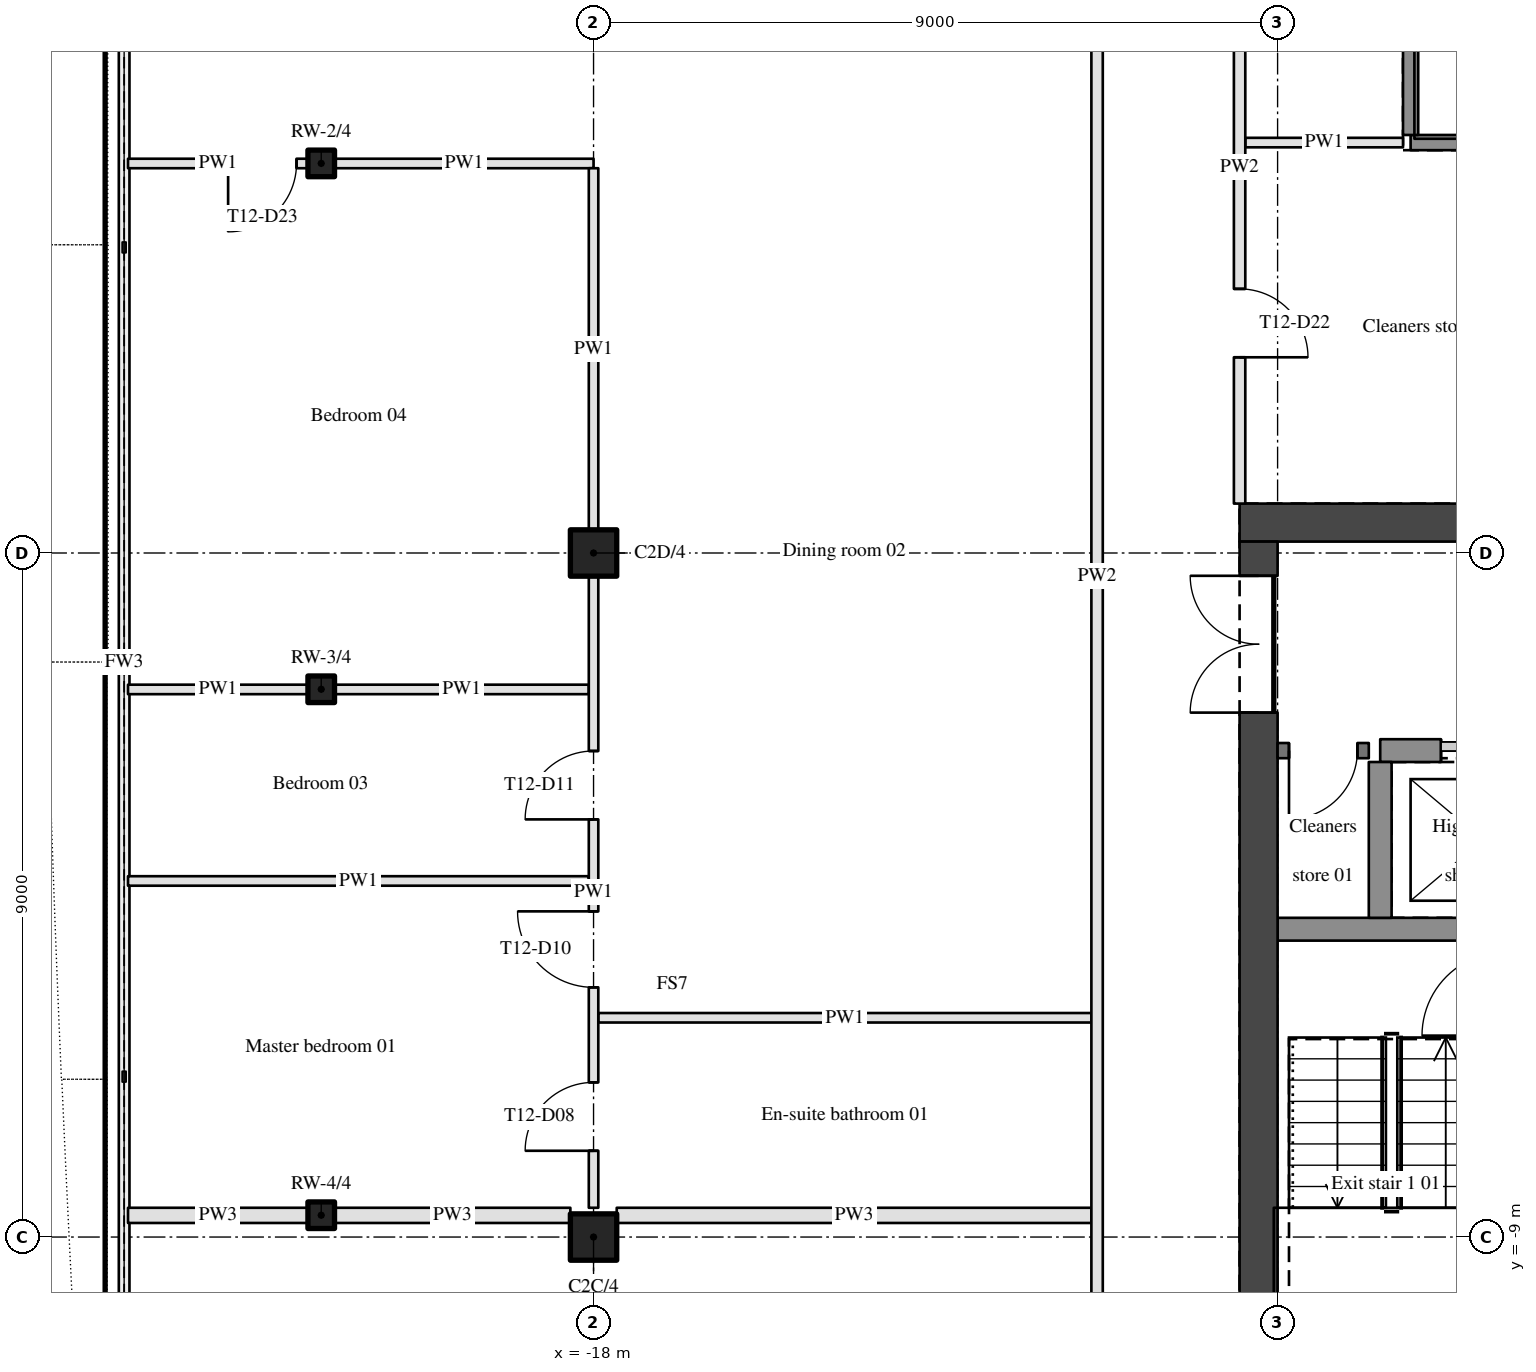
"""IFC4 building model, lengths in metres.
Left out: names, types, materials, properties, quantities, classifications, styles, units other than length and angle.
Written with IfcOpenShell. Run it as: python <this file> out.ifc"""

import sys

from ifc_helpers import new_model, si_unit, direction, frame, frame_2d, origin, origin_2d, place, context, subcontext, project, spatial, rectangle, hollow_rectangle, hollow_circle, extrude, element, fill, save


model = new_model("IFC4")
c1 = context("Model", 3, precision=1e-05, world=origin(), true_north=direction((0.0, 1.0)))
c2 = subcontext(c1, "Body", "Model", "MODEL_VIEW")
j1 = project(units=[si_unit("LENGTHUNIT", "METRE"), si_unit("PLANEANGLEUNIT", "RADIAN")], contexts=[c1])
p1 = place(None, origin())
s1 = spatial("IfcSite", under=j1, at=p1, CompositionType="ELEMENT")
p2 = place(p1, origin())
s2 = spatial("IfcBuilding", under=s1, at=p2, CompositionType="ELEMENT")
p3 = place(p2, frame((0.0, 0.0, 172.2)))
s3 = spatial("IfcBuildingStorey", under=s2, at=p3, CompositionType="ELEMENT", Elevation=172.2)
for number, where, z_axis, x_axis in (
    (1, (-18.0, -9.0, 0.0), (0.0, 0.0, 1.0), (1.0, 0.0, 0.0)),
    (2, (-18.0, 0.0, 0.0), (0.0, 0.0, 1.0), (1.0, 0.0, 0.0)),
):
    element("IfcColumn", number, at=place(p3, frame(where, z_axis=z_axis, x_axis=x_axis)), inside=s3, PredefinedType="COLUMN", context=c2, shape_type="SweptSolid", body=[
        extrude(hollow_circle(Radius=0.305, WallThickness=0.03, at=origin_2d()), origin(), (0.0, 0.0, 1.0), 3.15),
    ])
for number, where, z_axis, x_axis in (
    (3, (-21.583, 5.126, 0.0), (0.0, 0.0, 1.0), (1.0, 0.0, 0.0)),
    (4, (-21.583, -1.793, 0.0), (0.0, 0.0, 1.0), (1.0, 0.0, 0.0)),
    (5, (-21.583, -8.713, 0.0), (0.0, 0.0, 1.0), (1.0, 0.0, 0.0)),
):
    element("IfcColumn", number, at=place(p3, frame(where, z_axis=z_axis, x_axis=x_axis)), inside=s3, PredefinedType="COLUMN", context=c2, shape_type="SweptSolid", body=[
        extrude(hollow_rectangle(XDim=0.35, YDim=0.35, WallThickness=0.02, InnerFilletRadius=0.03, OuterFilletRadius=0.05, at=origin_2d()), origin(), (0.0, 0.0, 1.0), 3.15),
    ])
p4 = place(p3, frame((-9.5, 0.4, 0.0), z_axis=(0.0, 0.0, 1.0), x_axis=(1.0, 0.0, 0.0)))
e6 = element("IfcWall", 6, at=p4, inside=s3, PredefinedType="SHEAR", context=c2, shape_type="SweptSolid", body=[
    extrude(rectangle(XDim=19.0, YDim=0.5, at=frame_2d((9.5, 0.0))), origin(), (0.0, 0.0, 1.0), 3.15),
])
p5 = place(p4, frame((8.6, 0.0, 0.0)))
e7 = element("IfcOpeningElement", 7, at=p5, cuts=e6, PredefinedType="OPENING", context=c2, shape_type="SweptSolid", body=[
    extrude(rectangle(XDim=1.8, YDim=2.1, at=frame_2d((0.9, 1.05))), frame((0.0, 0.26, 0.0), z_axis=(0.0, -1.0, 0.0), x_axis=(1.0, 0.0, 0.0)), (0.0, 0.0, 1.0), 0.52),
])
p6 = place(p3, frame((-9.25, -11.5, 0.0), z_axis=(0.0, 0.0, 1.0), x_axis=(0.0, 1.0, 0.0)))
e8 = element("IfcWall", 8, at=p6, inside=s3, PredefinedType="SHEAR", context=c2, shape_type="SweptSolid", body=[
    extrude(rectangle(XDim=11.65, YDim=0.5, at=frame_2d((5.825, 0.0))), origin(), (0.0, 0.0, 1.0), 3.15),
])
p7 = place(p6, frame((9.4, 0.0, 0.0)))
e9 = element("IfcOpeningElement", 9, at=p7, cuts=e8, PredefinedType="OPENING", context=c2, shape_type="SweptSolid", body=[
    extrude(rectangle(XDim=1.8, YDim=2.1, at=frame_2d((0.9, 1.05))), frame((0.0, 0.26, 0.0), z_axis=(0.0, -1.0, 0.0), x_axis=(1.0, 0.0, 0.0)), (0.0, 0.0, 1.0), 0.52),
])
p8 = place(p3, frame((-24.125, -8.715, 0.0), z_axis=(0.0, 0.0, 1.0), x_axis=(1.0, 0.0, 0.0)))
e10 = element("IfcWall", 10, at=p8, inside=s3, PredefinedType="PARTITIONING", context=c2, shape_type="SweptSolid", body=[
    extrude(rectangle(XDim=2.367, YDim=0.2, at=frame_2d((1.184, 0.0))), origin(), (0.0, 0.0, 1.0), 2.21),
])
p9 = place(p3, frame((-21.408, -8.715, 0.0), z_axis=(0.0, 0.0, 1.0), x_axis=(1.0, 0.0, 0.0)))
e11 = element("IfcWall", 11, at=p9, inside=s3, PredefinedType="PARTITIONING", context=c2, shape_type="SweptSolid", body=[
    extrude(rectangle(XDim=3.103, YDim=0.2, at=frame_2d((1.552, 0.0))), origin(), (0.0, 0.0, 1.0), 2.21),
])
p10 = place(p3, frame((-17.695, -8.715, 0.0), z_axis=(0.0, 0.0, 1.0), x_axis=(1.0, 0.0, 0.0)))
e12 = element("IfcWall", 12, at=p10, inside=s3, PredefinedType="PARTITIONING", context=c2, shape_type="SweptSolid", body=[
    extrude(rectangle(XDim=6.245, YDim=0.2, at=frame_2d((3.123, 0.0))), origin(), (0.0, 0.0, 1.0), 2.21),
])
p11 = place(p3, frame((-17.938, -6.115, 0.0), z_axis=(0.0, 0.0, 1.0), x_axis=(1.0, 0.0, 0.0)))
e13 = element("IfcWall", 13, at=p11, inside=s3, PredefinedType="PARTITIONING", context=c2, shape_type="SweptSolid", body=[
    extrude(rectangle(XDim=6.488, YDim=0.125, at=frame_2d((3.244, 0.0))), origin(), (0.0, 0.0, 1.0), 2.21),
])
p12 = place(p3, frame((-9.0, -4.95, 0.0), z_axis=(0.0, 0.0, 1.0), x_axis=(1.0, 0.0, 0.0)))
e14 = element("IfcWall", 14, at=p12, inside=s3, PredefinedType="SHEAR", context=c2, shape_type="SweptSolid", body=[
    extrude(rectangle(XDim=6.75, YDim=0.3, at=frame_2d((3.375, 0.0))), origin(), (0.0, 0.0, 1.0), 3.15),
])
p13 = place(p3, frame((-24.125, -4.315, 0.0), z_axis=(0.0, 0.0, 1.0), x_axis=(1.0, 0.0, 0.0)))
e15 = element("IfcWall", 15, at=p13, inside=s3, PredefinedType="PARTITIONING", context=c2, shape_type="SweptSolid", body=[
    extrude(rectangle(XDim=6.062, YDim=0.125, at=frame_2d((3.031, 0.0))), origin(), (0.0, 0.0, 1.0), 2.21),
])
p14 = place(p3, frame((-7.8, -2.6, 0.0), z_axis=(0.0, 0.0, 1.0), x_axis=(-1.0, 0.0, 0.0)))
e16 = element("IfcWall", 16, at=p14, inside=s3, PredefinedType="SOLIDWALL", context=c2, shape_type="SweptSolid", body=[
    extrude(rectangle(XDim=1.2, YDim=0.2, at=frame_2d((0.6, 0.0))), origin(), (0.0, 0.0, 1.0), 2.85),
])
p15 = place(p14, frame((0.15, 0.0, 0.0)))
e17 = element("IfcOpeningElement", 17, at=p15, cuts=e16, PredefinedType="OPENING", context=c2, shape_type="SweptSolid", body=[
    extrude(rectangle(XDim=0.9, YDim=2.1, at=frame_2d((0.45, 1.05))), frame((0.0, 0.11, 0.0), z_axis=(0.0, -1.0, 0.0), x_axis=(1.0, 0.0, 0.0)), (0.0, 0.0, 1.0), 0.22),
])
p16 = place(p3, frame((-7.65, -2.6, 0.0), z_axis=(0.0, 0.0, 1.0), x_axis=(1.0, 0.0, 0.0)))
e18 = element("IfcWall", 18, at=p16, inside=s3, PredefinedType="SHEAR", context=c2, shape_type="SweptSolid", body=[
    extrude(rectangle(XDim=5.4, YDim=0.3, at=frame_2d((2.7, 0.0))), origin(), (0.0, 0.0, 1.0), 3.15),
])
p17 = place(p16, frame((0.8, 0.0, 0.0)))
e19 = element("IfcOpeningElement", 19, at=p17, cuts=e18, PredefinedType="OPENING", context=c2, shape_type="SweptSolid", body=[
    extrude(rectangle(XDim=1.1, YDim=2.1, at=frame_2d((0.55, 1.05))), frame((0.0, 0.16, 0.0), z_axis=(0.0, -1.0, 0.0), x_axis=(1.0, 0.0, 0.0)), (0.0, 0.0, 1.0), 0.32),
])
p18 = place(p16, frame((3.5, 0.0, 0.0)))
e20 = element("IfcOpeningElement", 20, at=p18, cuts=e18, PredefinedType="OPENING", context=c2, shape_type="SweptSolid", body=[
    extrude(rectangle(XDim=1.1, YDim=2.1, at=frame_2d((0.55, 1.05))), frame((0.0, 0.16, 0.0), z_axis=(0.0, -1.0, 0.0), x_axis=(1.0, 0.0, 0.0)), (0.0, 0.0, 1.0), 0.32),
])
p19 = place(p3, frame((-24.125, -1.795, 0.0), z_axis=(0.0, 0.0, 1.0), x_axis=(1.0, 0.0, 0.0)))
e21 = element("IfcWall", 21, at=p19, inside=s3, PredefinedType="PARTITIONING", context=c2, shape_type="SweptSolid", body=[
    extrude(rectangle(XDim=2.367, YDim=0.125, at=frame_2d((1.184, 0.0))), origin(), (0.0, 0.0, 1.0), 2.21),
])
p20 = place(p3, frame((-21.408, -1.795, 0.0), z_axis=(0.0, 0.0, 1.0), x_axis=(1.0, 0.0, 0.0)))
e22 = element("IfcWall", 22, at=p20, inside=s3, PredefinedType="PARTITIONING", context=c2, shape_type="SweptSolid", body=[
    extrude(rectangle(XDim=3.345, YDim=0.125, at=frame_2d((1.673, 0.0))), origin(), (0.0, 0.0, 1.0), 2.21),
])
p21 = place(p3, frame((-21.758, 5.125, 0.0), z_axis=(0.0, 0.0, 1.0), x_axis=(-1.0, 0.0, 0.0)))
e23 = element("IfcWall", 23, at=p21, inside=s3, PredefinedType="PARTITIONING", context=c2, shape_type="SweptSolid", body=[
    extrude(rectangle(XDim=2.367, YDim=0.125, at=frame_2d((1.184, 0.0))), origin(), (0.0, 0.0, 1.0), 2.21),
])
p22 = place(p21, frame((0.15, 0.0, 0.0)))
e24 = element("IfcOpeningElement", 24, at=p22, cuts=e23, PredefinedType="OPENING", context=c2, shape_type="SweptSolid", body=[
    extrude(rectangle(XDim=0.9, YDim=2.1, at=frame_2d((0.45, 1.05))), frame((0.0, 0.073, 0.0), z_axis=(0.0, -1.0, 0.0), x_axis=(1.0, 0.0, 0.0)), (0.0, 0.0, 1.0), 0.145),
])
p23 = place(p3, frame((-21.408, 5.125, 0.0), z_axis=(0.0, 0.0, 1.0), x_axis=(1.0, 0.0, 0.0)))
e25 = element("IfcWall", 25, at=p23, inside=s3, PredefinedType="PARTITIONING", context=c2, shape_type="SweptSolid", body=[
    extrude(rectangle(XDim=3.408, YDim=0.125, at=frame_2d((1.704, 0.0))), origin(), (0.0, 0.0, 1.0), 2.21),
])
p24 = place(p3, frame((-9.425, 5.4, 0.0), z_axis=(0.0, 0.0, 1.0), x_axis=(1.0, 0.0, 0.0)))
e26 = element("IfcWall", 26, at=p24, inside=s3, PredefinedType="PARTITIONING", context=c2, shape_type="SweptSolid", body=[
    extrude(rectangle(XDim=2.075, YDim=0.125, at=frame_2d((1.038, 0.0))), origin(), (0.0, 0.0, 1.0), 2.21),
])
p25 = place(p3, frame((-7.25, 5.4, 0.0), z_axis=(0.0, 0.0, 1.0), x_axis=(1.0, 0.0, 0.0)))
e27 = element("IfcWall", 27, at=p25, inside=s3, PredefinedType="SHEAR", context=c2, shape_type="SweptSolid", body=[
    extrude(rectangle(XDim=6.6, YDim=0.2, at=frame_2d((3.3, 0.0))), origin(), (0.0, 0.0, 1.0), 3.15),
])
p26 = place(p25, frame((5.35, 0.0, 0.0)))
e28 = element("IfcOpeningElement", 28, at=p26, cuts=e27, PredefinedType="OPENING", context=c2, shape_type="SweptSolid", body=[
    extrude(rectangle(XDim=1.1, YDim=2.1, at=frame_2d((0.55, 1.05))), frame((0.0, 0.11, 0.0), z_axis=(0.0, -1.0, 0.0), x_axis=(1.0, 0.0, 0.0)), (0.0, 0.0, 1.0), 0.22),
])
p27 = place(p3, frame((-18.0, -8.615, 0.0), z_axis=(0.0, 0.0, 1.0), x_axis=(0.0, 1.0, 0.0)))
e29 = element("IfcWall", 29, at=p27, inside=s3, PredefinedType="PARTITIONING", context=c2, shape_type="SweptSolid", body=[
    extrude(rectangle(XDim=8.31, YDim=0.125, at=frame_2d((4.155, 0.0))), origin(), (0.0, 0.0, 1.0), 2.21),
])
p28 = place(p27, frame((5.11, 0.0, 0.0)))
e30 = element("IfcOpeningElement", 30, at=p28, cuts=e29, PredefinedType="OPENING", context=c2, shape_type="SweptSolid", body=[
    extrude(rectangle(XDim=0.9, YDim=2.1, at=frame_2d((0.45, 1.05))), frame((0.0, 0.073, 0.0), z_axis=(0.0, -1.0, 0.0), x_axis=(1.0, 0.0, 0.0)), (0.0, 0.0, 1.0), 0.145),
])
p29 = place(p27, frame((2.9, 0.0, 0.0)))
e31 = element("IfcOpeningElement", 31, at=p29, cuts=e29, PredefinedType="OPENING", context=c2, shape_type="SweptSolid", body=[
    extrude(rectangle(XDim=1.0, YDim=2.1, at=frame_2d((0.5, 1.05))), frame((0.0, 0.073, 0.0), z_axis=(0.0, -1.0, 0.0), x_axis=(1.0, 0.0, 0.0)), (0.0, 0.0, 1.0), 0.145),
])
p30 = place(p27, frame((0.75, 0.0, 0.0)))
e32 = element("IfcOpeningElement", 32, at=p30, cuts=e29, PredefinedType="OPENING", context=c2, shape_type="SweptSolid", body=[
    extrude(rectangle(XDim=0.9, YDim=2.1, at=frame_2d((0.45, 1.05))), frame((0.0, 0.073, 0.0), z_axis=(0.0, -1.0, 0.0), x_axis=(1.0, 0.0, 0.0)), (0.0, 0.0, 1.0), 0.145),
])
p31 = place(p3, frame((-18.0, 0.305, 0.0), z_axis=(0.0, 0.0, 1.0), x_axis=(0.0, 1.0, 0.0)))
e33 = element("IfcWall", 33, at=p31, inside=s3, PredefinedType="PARTITIONING", context=c2, shape_type="SweptSolid", body=[
    extrude(rectangle(XDim=4.758, YDim=0.125, at=frame_2d((2.379, 0.0))), origin(), (0.0, 0.0, 1.0), 2.21),
])
p32 = place(p3, frame((-11.375, -11.925, 0.0), z_axis=(0.0, 0.0, 1.0), x_axis=(0.0, 1.0, 0.0)))
e34 = element("IfcWall", 34, at=p32, inside=s3, PredefinedType="PARTITIONING", context=c2, shape_type="SweptSolid", body=[
    extrude(rectangle(XDim=23.25, YDim=0.15, at=frame_2d((11.625, 0.0))), origin(), (0.0, 0.0, 1.0), 2.21),
])
p33 = place(p32, frame((1.067, 0.0, 0.0)))
e35 = element("IfcOpeningElement", 35, at=p33, cuts=e34, PredefinedType="OPENING", context=c2, shape_type="SweptSolid", body=[
    extrude(rectangle(XDim=1.0, YDim=2.1, at=frame_2d((0.5, 1.05))), frame((0.0, 0.085, 0.0), z_axis=(0.0, -1.0, 0.0), x_axis=(1.0, 0.0, 0.0)), (0.0, 0.0, 1.0), 0.17),
])
p34 = place(p32, frame((19.01, 0.0, 0.0)))
e36 = element("IfcOpeningElement", 36, at=p34, cuts=e34, PredefinedType="OPENING", context=c2, shape_type="SweptSolid", body=[
    extrude(rectangle(XDim=1.0, YDim=2.1, at=frame_2d((0.5, 1.05))), frame((0.0, 0.085, 0.0), z_axis=(0.0, -1.0, 0.0), x_axis=(1.0, 0.0, 0.0)), (0.0, 0.0, 1.0), 0.17),
])
p35 = place(p3, frame((-9.5, 9.5, 0.0), z_axis=(0.0, 0.0, 1.0), x_axis=(0.0, -1.0, 0.0)))
e37 = element("IfcWall", 37, at=p35, inside=s3, PredefinedType="PARTITIONING", context=c2, shape_type="SweptSolid", body=[
    extrude(rectangle(XDim=8.85, YDim=0.15, at=frame_2d((4.425, 0.0))), origin(), (0.0, 0.0, 1.0), 2.21),
])
p36 = place(p35, frame((6.025, 0.0, 0.0)))
e38 = element("IfcOpeningElement", 38, at=p36, cuts=e37, PredefinedType="OPENING", context=c2, shape_type="SweptSolid", body=[
    extrude(rectangle(XDim=0.9, YDim=2.1, at=frame_2d((0.45, 1.05))), frame((0.0, 0.085, 0.0), z_axis=(0.0, -1.0, 0.0), x_axis=(1.0, 0.0, 0.0)), (0.0, 0.0, 1.0), 0.17),
])
p37 = place(p3, frame((-7.65, -4.8, 0.0), z_axis=(0.0, 0.0, 1.0), x_axis=(0.0, 1.0, 0.0)))
e39 = element("IfcWall", 39, at=p37, inside=s3, PredefinedType="SHEAR", context=c2, shape_type="SweptSolid", body=[
    extrude(rectangle(XDim=2.05, YDim=0.3, at=frame_2d((1.025, 0.0))), origin(), (0.0, 0.0, 1.0), 3.15),
])
p38 = place(p3, frame((-7.25, 5.5, 0.0), z_axis=(0.0, 0.0, 1.0), x_axis=(0.0, 1.0, 0.0)))
e40 = element("IfcWall", 40, at=p38, inside=s3, PredefinedType="SHEAR", context=c2, shape_type="SweptSolid", body=[
    extrude(rectangle(XDim=2.7, YDim=0.2, at=frame_2d((1.35, 0.0))), origin(), (0.0, 0.0, 1.0), 3.15),
])
p39 = place(p7, origin())
e41 = element("IfcDoor", 41, at=p39, inside=s3, OperationType="DOUBLE_DOOR_SINGLE_SWING", PredefinedType="DOOR", context=c2, shape_type="SweptSolid", body=[
    extrude(rectangle(XDim=1.8, YDim=2.1, at=frame_2d((0.9, 1.05))), frame((0.0, 0.025, 0.0), z_axis=(0.0, -1.0, 0.0), x_axis=(1.0, 0.0, 0.0)), (0.0, 0.0, 1.0), 0.05),
])
fill(e9, e41)
p40 = place(p15, origin())
e42 = element("IfcDoor", 42, at=p40, inside=s3, OperationType="SINGLE_SWING_RIGHT", PredefinedType="DOOR", context=c2, shape_type="SweptSolid", body=[
    extrude(rectangle(XDim=0.9, YDim=2.1, at=frame_2d((0.45, 1.05))), frame((0.0, 0.025, 0.0), z_axis=(0.0, -1.0, 0.0), x_axis=(1.0, 0.0, 0.0)), (0.0, 0.0, 1.0), 0.05),
])
fill(e17, e42)
p41 = place(p28, origin())
e43 = element("IfcDoor", 43, at=p41, inside=s3, OperationType="SINGLE_SWING_LEFT", PredefinedType="DOOR", context=c2, shape_type="SweptSolid", body=[
    extrude(rectangle(XDim=0.9, YDim=2.1, at=frame_2d((0.45, 1.05))), frame((0.0, 0.025, 0.0), z_axis=(0.0, -1.0, 0.0), x_axis=(1.0, 0.0, 0.0)), (0.0, 0.0, 1.0), 0.05),
])
fill(e30, e43)
p42 = place(p29, origin())
e44 = element("IfcDoor", 44, at=p42, inside=s3, OperationType="SINGLE_SWING_RIGHT", PredefinedType="DOOR", context=c2, shape_type="SweptSolid", body=[
    extrude(rectangle(XDim=1.0, YDim=2.1, at=frame_2d((0.5, 1.05))), frame((0.0, 0.025, 0.0), z_axis=(0.0, -1.0, 0.0), x_axis=(1.0, 0.0, 0.0)), (0.0, 0.0, 1.0), 0.05),
])
fill(e31, e44)
p43 = place(p22, origin())
e45 = element("IfcDoor", 45, at=p43, inside=s3, OperationType="SINGLE_SWING_RIGHT", PredefinedType="DOOR", context=c2, shape_type="SweptSolid", body=[
    extrude(rectangle(XDim=0.9, YDim=2.1, at=frame_2d((0.45, 1.05))), frame((0.0, 0.025, 0.0), z_axis=(0.0, -1.0, 0.0), x_axis=(1.0, 0.0, 0.0)), (0.0, 0.0, 1.0), 0.05),
])
fill(e24, e45)
p44 = place(p30, origin())
e46 = element("IfcDoor", 46, at=p44, inside=s3, OperationType="SINGLE_SWING_LEFT", PredefinedType="DOOR", context=c2, shape_type="SweptSolid", body=[
    extrude(rectangle(XDim=0.9, YDim=2.1, at=frame_2d((0.45, 1.05))), frame((0.0, 0.025, 0.0), z_axis=(0.0, -1.0, 0.0), x_axis=(1.0, 0.0, 0.0)), (0.0, 0.0, 1.0), 0.05),
])
fill(e32, e46)
p45 = place(p36, origin())
e47 = element("IfcDoor", 47, at=p45, inside=s3, OperationType="SINGLE_SWING_RIGHT", PredefinedType="DOOR", context=c2, shape_type="SweptSolid", body=[
    extrude(rectangle(XDim=0.9, YDim=2.1, at=frame_2d((0.45, 1.05))), frame((0.0, 0.025, 0.0), z_axis=(0.0, -1.0, 0.0), x_axis=(1.0, 0.0, 0.0)), (0.0, 0.0, 1.0), 0.05),
])
fill(e38, e47)
p46 = place(p17, origin())
e48 = element("IfcDoor", 48, at=p46, inside=s3, OperationType="DOUBLE_DOOR_SLIDING", PredefinedType="DOOR", context=c2, shape_type="SweptSolid", body=[
    extrude(rectangle(XDim=1.1, YDim=2.1, at=frame_2d((0.55, 1.05))), frame((0.0, 0.025, 0.0), z_axis=(0.0, -1.0, 0.0), x_axis=(1.0, 0.0, 0.0)), (0.0, 0.0, 1.0), 0.05),
])
fill(e19, e48)
save(model, sys.argv[1])
